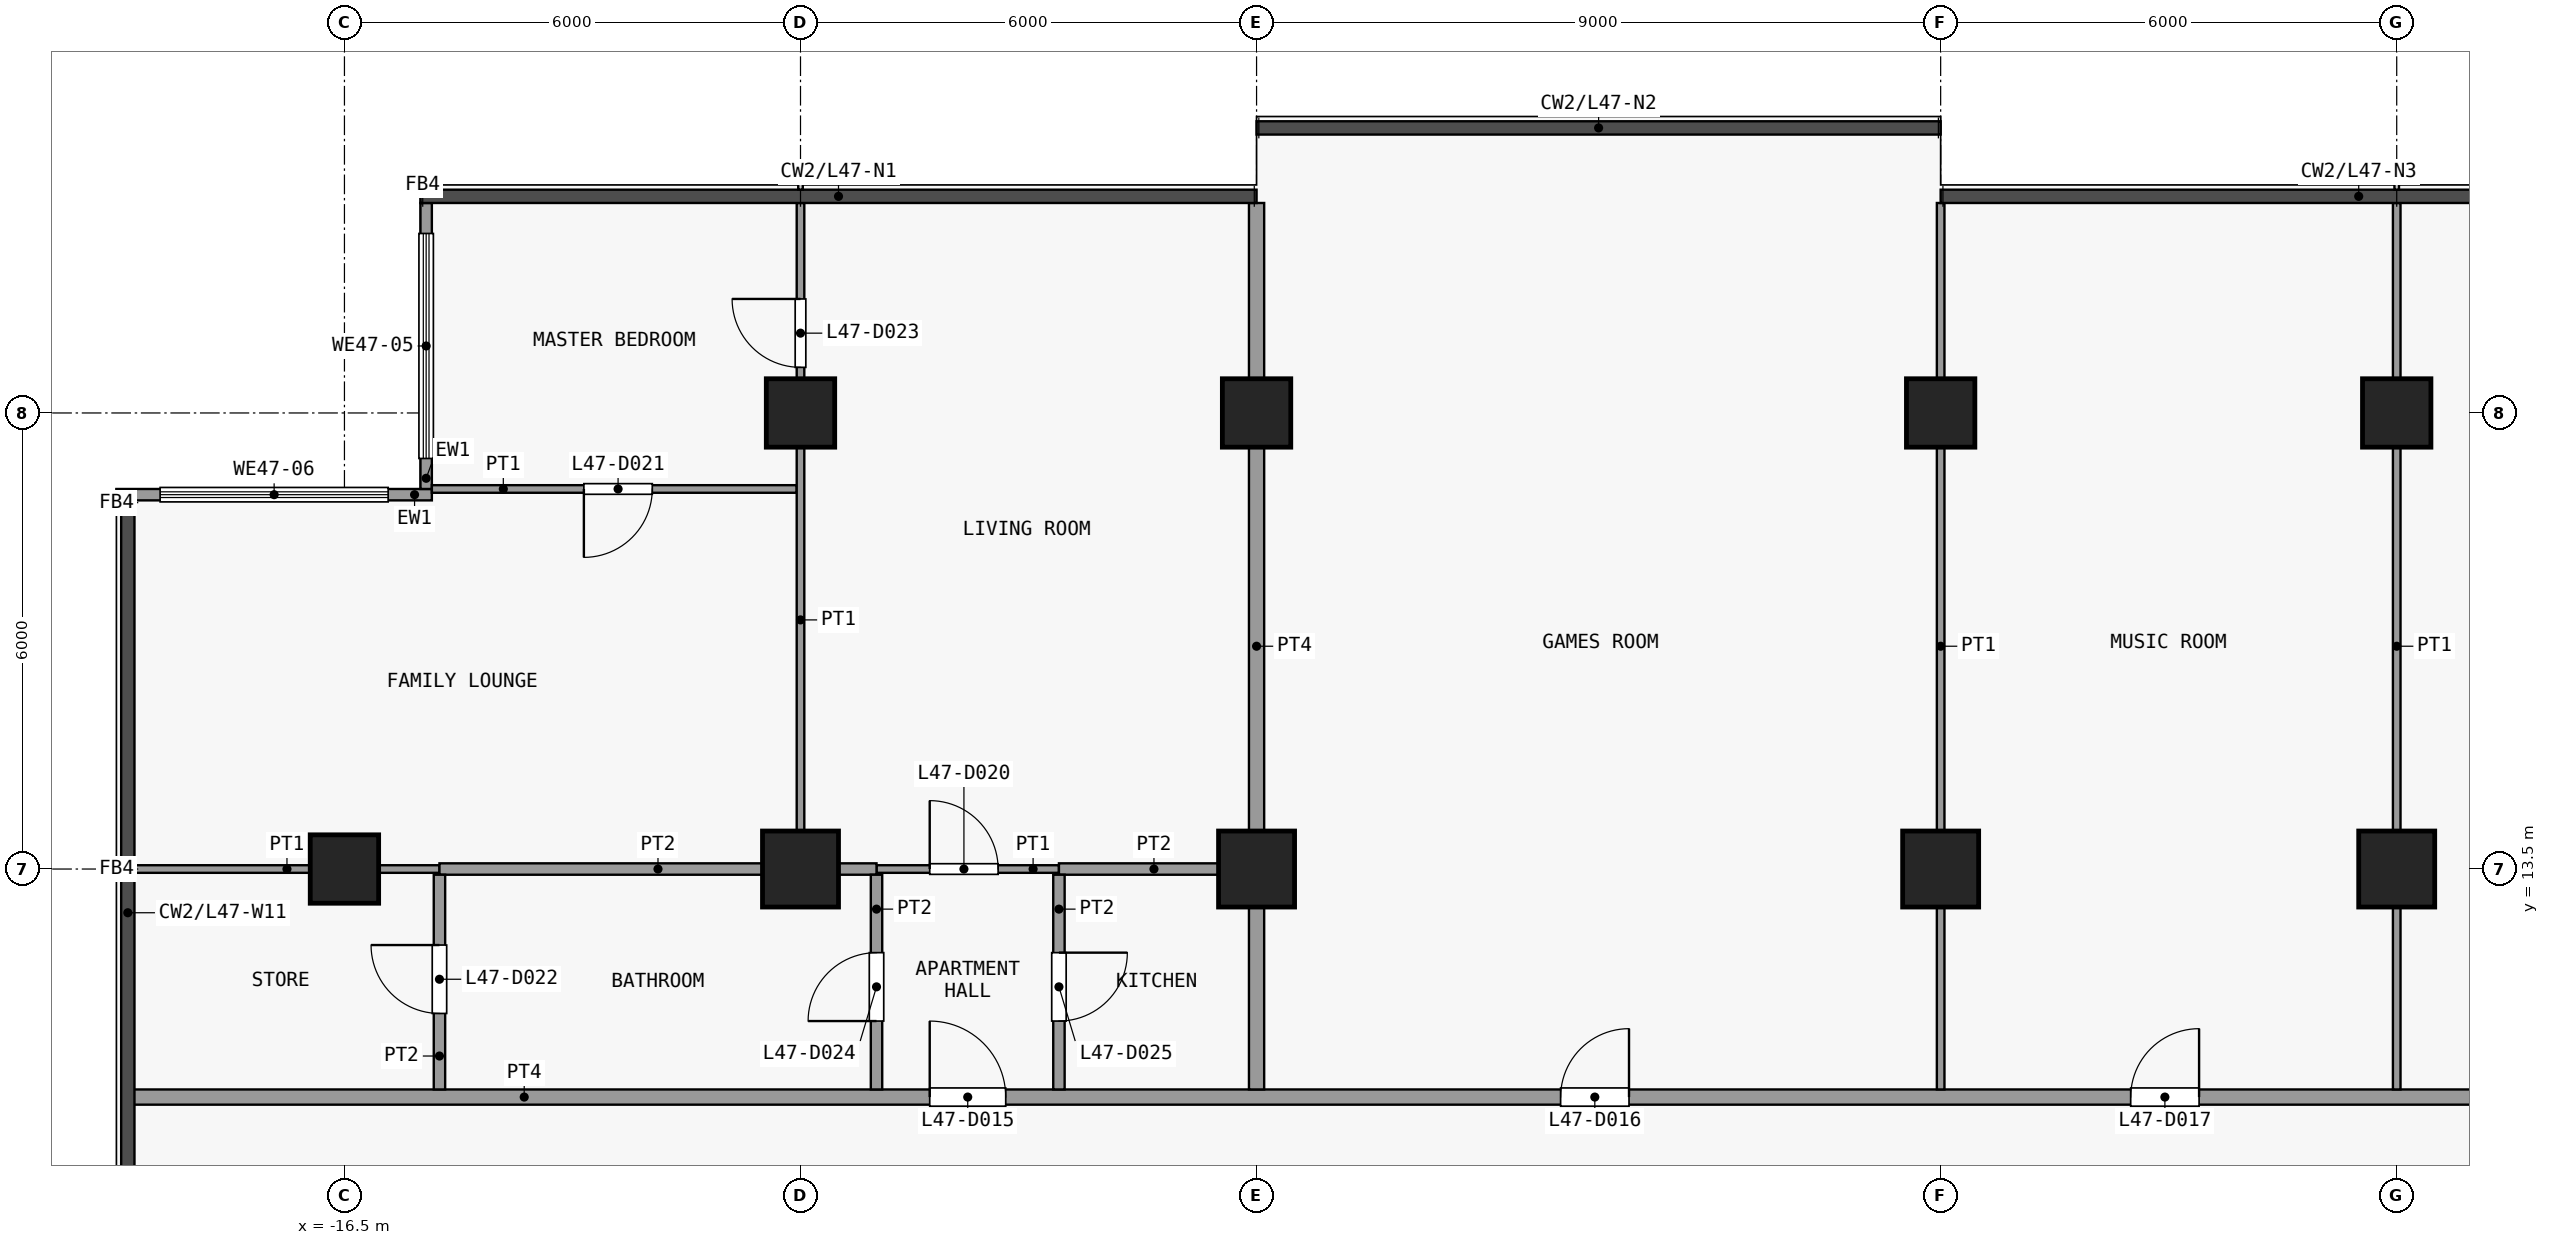
"""IFC4 building model, lengths in metres.
Left out: names, types, materials, properties, quantities, classifications, styles, units other than length and angle.
Written with IfcOpenShell. Run it as: python <this file> out.ifc"""

import sys

from ifc_helpers import new_model, si_unit, direction, frame, frame_2d, origin, origin_2d, place, context, subcontext, project, spatial, rectangle, extrude, element, fill, save


model = new_model("IFC4")
c1 = context("Model", 3, precision=1e-05, world=origin(), true_north=direction((0.0, 1.0)))
c2 = subcontext(c1, "Body", "Model", "MODEL_VIEW")
j1 = project(units=[si_unit("LENGTHUNIT", "METRE"), si_unit("PLANEANGLEUNIT", "RADIAN")], contexts=[c1])
p1 = place(None, origin())
s1 = spatial("IfcSite", under=j1, at=p1, CompositionType="ELEMENT")
p2 = place(p1, origin())
s2 = spatial("IfcBuilding", under=s1, at=p2, CompositionType="ELEMENT")
p3 = place(p2, frame((0.0, 0.0, 188.9)))
s3 = spatial("IfcBuildingStorey", under=s2, at=p3, CompositionType="ELEMENT", Elevation=188.9)
p4 = place(p3, frame((-16.5, 13.5, 0.0), z_axis=(0.0, 0.0, 1.0), x_axis=(1.0, 0.0, 0.0)))
e1 = element("IfcColumn", 1, at=p4, inside=s3, PredefinedType="COLUMN", context=c2, shape_type="SweptSolid", body=[
    extrude(rectangle(XDim=0.9, YDim=0.9, at=origin_2d()), origin(), (0.0, 0.0, 1.0), 3.6),
])
p5 = place(p3, frame((-10.5, 13.5, 0.0), z_axis=(0.0, 0.0, 1.0), x_axis=(1.0, 0.0, 0.0)))
e2 = element("IfcColumn", 2, at=p5, inside=s3, PredefinedType="COLUMN", context=c2, shape_type="SweptSolid", body=[
    extrude(rectangle(XDim=1.0, YDim=1.0, at=origin_2d()), origin(), (0.0, 0.0, 1.0), 3.6),
])
p6 = place(p3, frame((-10.5, 19.5, 0.0), z_axis=(0.0, 0.0, 1.0), x_axis=(1.0, 0.0, 0.0)))
e3 = element("IfcColumn", 3, at=p6, inside=s3, PredefinedType="COLUMN", context=c2, shape_type="SweptSolid", body=[
    extrude(rectangle(XDim=0.9, YDim=0.9, at=origin_2d()), origin(), (0.0, 0.0, 1.0), 3.6),
])
p7 = place(p3, frame((-4.5, 13.5, 0.0), z_axis=(0.0, 0.0, 1.0), x_axis=(1.0, 0.0, 0.0)))
e4 = element("IfcColumn", 4, at=p7, inside=s3, PredefinedType="COLUMN", context=c2, shape_type="SweptSolid", body=[
    extrude(rectangle(XDim=1.0, YDim=1.0, at=origin_2d()), origin(), (0.0, 0.0, 1.0), 3.6),
])
p8 = place(p3, frame((-4.5, 19.5, 0.0), z_axis=(0.0, 0.0, 1.0), x_axis=(1.0, 0.0, 0.0)))
e5 = element("IfcColumn", 5, at=p8, inside=s3, PredefinedType="COLUMN", context=c2, shape_type="SweptSolid", body=[
    extrude(rectangle(XDim=0.9, YDim=0.9, at=origin_2d()), origin(), (0.0, 0.0, 1.0), 3.6),
])
p9 = place(p3, frame((4.5, 13.5, 0.0), z_axis=(0.0, 0.0, 1.0), x_axis=(1.0, 0.0, 0.0)))
e6 = element("IfcColumn", 6, at=p9, inside=s3, PredefinedType="COLUMN", context=c2, shape_type="SweptSolid", body=[
    extrude(rectangle(XDim=1.0, YDim=1.0, at=origin_2d()), origin(), (0.0, 0.0, 1.0), 3.6),
])
p10 = place(p3, frame((4.5, 19.5, 0.0), z_axis=(0.0, 0.0, 1.0), x_axis=(1.0, 0.0, 0.0)))
e7 = element("IfcColumn", 7, at=p10, inside=s3, PredefinedType="COLUMN", context=c2, shape_type="SweptSolid", body=[
    extrude(rectangle(XDim=0.9, YDim=0.9, at=origin_2d()), origin(), (0.0, 0.0, 1.0), 3.6),
])
p11 = place(p3, frame((10.5, 13.5, 0.0), z_axis=(0.0, 0.0, 1.0), x_axis=(1.0, 0.0, 0.0)))
e8 = element("IfcColumn", 8, at=p11, inside=s3, PredefinedType="COLUMN", context=c2, shape_type="SweptSolid", body=[
    extrude(rectangle(XDim=1.0, YDim=1.0, at=origin_2d()), origin(), (0.0, 0.0, 1.0), 3.6),
])
p12 = place(p3, frame((10.5, 19.5, 0.0), z_axis=(0.0, 0.0, 1.0), x_axis=(1.0, 0.0, 0.0)))
e9 = element("IfcColumn", 9, at=p12, inside=s3, PredefinedType="COLUMN", context=c2, shape_type="SweptSolid", body=[
    extrude(rectangle(XDim=0.9, YDim=0.9, at=origin_2d()), origin(), (0.0, 0.0, 1.0), 3.6),
])
p13 = place(p3, frame((-15.425, 18.5, 0.0), z_axis=(0.0, 0.0, 1.0), x_axis=(0.0, 1.0, 0.0)))
e10 = element("IfcWall", 10, at=p13, inside=s3, PredefinedType="SOLIDWALL", context=c2, shape_type="SweptSolid", body=[
    extrude(rectangle(XDim=3.762, YDim=0.15, at=frame_2d((1.881, 0.0))), origin(), (0.0, 0.0, 1.0), 3.3),
])
p14 = place(p13, frame((0.401, 0.0, 0.9)))
e11 = element("IfcOpeningElement", 11, at=p14, cuts=e10, PredefinedType="OPENING", context=c2, shape_type="SweptSolid", body=[
    extrude(rectangle(XDim=2.96, YDim=2.4, at=frame_2d((1.48, 1.2))), frame((0.0, 0.085, 0.0), z_axis=(0.0, -1.0, 0.0), x_axis=(1.0, 0.0, 0.0)), (0.0, 0.0, 1.0), 0.17),
])
p15 = place(p3, frame((-19.5, 18.425, 0.0), z_axis=(0.0, 0.0, 1.0), x_axis=(1.0, 0.0, 0.0)))
e12 = element("IfcWall", 12, at=p15, inside=s3, PredefinedType="SOLIDWALL", context=c2, shape_type="SweptSolid", body=[
    extrude(rectangle(XDim=4.15, YDim=0.15, at=frame_2d((2.075, 0.0))), origin(), (0.0, 0.0, 1.0), 3.3),
])
p16 = place(p15, frame((0.575, 0.0, 0.9)))
e13 = element("IfcOpeningElement", 13, at=p16, cuts=e12, PredefinedType="OPENING", context=c2, shape_type="SweptSolid", body=[
    extrude(rectangle(XDim=3.0, YDim=2.4, at=frame_2d((1.5, 1.2))), frame((0.0, 0.085, 0.0), z_axis=(0.0, -1.0, 0.0), x_axis=(1.0, 0.0, 0.0)), (0.0, 0.0, 1.0), 0.17),
])
p17 = place(p3, frame((-19.35, 10.5, 0.0), z_axis=(0.0, 0.0, 1.0), x_axis=(1.0, 0.0, 0.0)))
e14 = element("IfcWall", 14, at=p17, inside=s3, PredefinedType="PARTITIONING", context=c2, shape_type="SweptSolid", body=[
    extrude(rectangle(XDim=38.7, YDim=0.2, at=frame_2d((19.35, 0.0))), origin(), (0.0, 0.0, 1.0), 3.3),
])
p18 = place(p17, frame((10.55, 0.0, 0.0)))
e15 = element("IfcOpeningElement", 15, at=p18, cuts=e14, PredefinedType="OPENING", context=c2, shape_type="SweptSolid", body=[
    extrude(rectangle(XDim=1.0, YDim=2.1, at=frame_2d((0.5, 1.05))), frame((0.0, 0.11, 0.0), z_axis=(0.0, -1.0, 0.0), x_axis=(1.0, 0.0, 0.0)), (0.0, 0.0, 1.0), 0.22),
])
p19 = place(p17, frame((18.85, 0.0, 0.0)))
e16 = element("IfcOpeningElement", 16, at=p19, cuts=e14, PredefinedType="OPENING", context=c2, shape_type="SweptSolid", body=[
    extrude(rectangle(XDim=0.9, YDim=2.1, at=frame_2d((0.45, 1.05))), frame((0.0, 0.11, 0.0), z_axis=(0.0, -1.0, 0.0), x_axis=(1.0, 0.0, 0.0)), (0.0, 0.0, 1.0), 0.22),
])
p20 = place(p17, frame((26.35, 0.0, 0.0)))
e17 = element("IfcOpeningElement", 17, at=p20, cuts=e14, PredefinedType="OPENING", context=c2, shape_type="SweptSolid", body=[
    extrude(rectangle(XDim=0.9, YDim=2.1, at=frame_2d((0.45, 1.05))), frame((0.0, 0.11, 0.0), z_axis=(0.0, -1.0, 0.0), x_axis=(1.0, 0.0, 0.0)), (0.0, 0.0, 1.0), 0.22),
])
p21 = place(p17, frame((32.35, 0.0, 0.0)))
e18 = element("IfcOpeningElement", 18, at=p21, cuts=e14, PredefinedType="OPENING", context=c2, shape_type="SweptSolid", body=[
    extrude(rectangle(XDim=0.9, YDim=2.1, at=frame_2d((0.45, 1.05))), frame((0.0, 0.11, 0.0), z_axis=(0.0, -1.0, 0.0), x_axis=(1.0, 0.0, 0.0)), (0.0, 0.0, 1.0), 0.22),
])
p22 = place(p17, frame((36.85, 0.0, 0.0)))
e19 = element("IfcOpeningElement", 19, at=p22, cuts=e14, PredefinedType="OPENING", context=c2, shape_type="SweptSolid", body=[
    extrude(rectangle(XDim=0.9, YDim=2.1, at=frame_2d((0.45, 1.05))), frame((0.0, 0.11, 0.0), z_axis=(0.0, -1.0, 0.0), x_axis=(1.0, 0.0, 0.0)), (0.0, 0.0, 1.0), 0.22),
])
p23 = place(p3, frame((-19.262, 13.5, 0.0), z_axis=(0.0, 0.0, 1.0), x_axis=(1.0, 0.0, 0.0)))
e20 = element("IfcWall", 20, at=p23, inside=s3, PredefinedType="PARTITIONING", context=c2, shape_type="SweptSolid", body=[
    extrude(rectangle(XDim=4.012, YDim=0.1, at=frame_2d((2.006, 0.0))), origin(), (0.0, 0.0, 1.0), 3.3),
])
p24 = place(p3, frame((-9.5, 13.5, 0.0), z_axis=(0.0, 0.0, 1.0), x_axis=(1.0, 0.0, 0.0)))
e21 = element("IfcWall", 21, at=p24, inside=s3, PredefinedType="PARTITIONING", context=c2, shape_type="SweptSolid", body=[
    extrude(rectangle(XDim=2.4, YDim=0.1, at=frame_2d((1.2, 0.0))), origin(), (0.0, 0.0, 1.0), 3.3),
])
p25 = place(p24, frame((0.7, 0.0, 0.0)))
e22 = element("IfcOpeningElement", 22, at=p25, cuts=e21, PredefinedType="OPENING", context=c2, shape_type="SweptSolid", body=[
    extrude(rectangle(XDim=0.9, YDim=2.1, at=frame_2d((0.45, 1.05))), frame((0.0, 0.06, 0.0), z_axis=(0.0, -1.0, 0.0), x_axis=(1.0, 0.0, 0.0)), (0.0, 0.0, 1.0), 0.12),
])
p26 = place(p3, frame((-15.25, 13.5, 0.0), z_axis=(0.0, 0.0, 1.0), x_axis=(1.0, 0.0, 0.0)))
e23 = element("IfcWall", 23, at=p26, inside=s3, PredefinedType="PARTITIONING", context=c2, shape_type="SweptSolid", body=[
    extrude(rectangle(XDim=5.75, YDim=0.15, at=frame_2d((2.875, 0.0))), origin(), (0.0, 0.0, 1.0), 3.3),
])
p27 = place(p3, frame((-7.1, 13.5, 0.0), z_axis=(0.0, 0.0, 1.0), x_axis=(1.0, 0.0, 0.0)))
e24 = element("IfcWall", 24, at=p27, inside=s3, PredefinedType="PARTITIONING", context=c2, shape_type="SweptSolid", body=[
    extrude(rectangle(XDim=2.5, YDim=0.15, at=frame_2d((1.25, 0.0))), origin(), (0.0, 0.0, 1.0), 3.3),
])
p28 = place(p3, frame((-15.35, 18.5, 0.0), z_axis=(0.0, 0.0, 1.0), x_axis=(1.0, 0.0, 0.0)))
e25 = element("IfcWall", 25, at=p28, inside=s3, PredefinedType="PARTITIONING", context=c2, shape_type="SweptSolid", body=[
    extrude(rectangle(XDim=4.8, YDim=0.1, at=frame_2d((2.4, 0.0))), origin(), (0.0, 0.0, 1.0), 3.3),
])
p29 = place(p28, frame((2.0, 0.0, 0.0)))
e26 = element("IfcOpeningElement", 26, at=p29, cuts=e25, PredefinedType="OPENING", context=c2, shape_type="SweptSolid", body=[
    extrude(rectangle(XDim=0.9, YDim=2.1, at=frame_2d((0.45, 1.05))), frame((0.0, 0.06, 0.0), z_axis=(0.0, -1.0, 0.0), x_axis=(1.0, 0.0, 0.0)), (0.0, 0.0, 1.0), 0.12),
])
p30 = place(p3, frame((-15.25, 10.6, 0.0), z_axis=(0.0, 0.0, 1.0), x_axis=(0.0, 1.0, 0.0)))
e27 = element("IfcWall", 27, at=p30, inside=s3, PredefinedType="PARTITIONING", context=c2, shape_type="SweptSolid", body=[
    extrude(rectangle(XDim=2.825, YDim=0.15, at=frame_2d((1.413, 0.0))), origin(), (0.0, 0.0, 1.0), 3.3),
])
p31 = place(p30, frame((1.0, 0.0, 0.0)))
e28 = element("IfcOpeningElement", 28, at=p31, cuts=e27, PredefinedType="OPENING", context=c2, shape_type="SweptSolid", body=[
    extrude(rectangle(XDim=0.9, YDim=2.1, at=frame_2d((0.45, 1.05))), frame((0.0, 0.085, 0.0), z_axis=(0.0, -1.0, 0.0), x_axis=(1.0, 0.0, 0.0)), (0.0, 0.0, 1.0), 0.17),
])
p32 = place(p3, frame((-10.5, 13.575, 0.0), z_axis=(0.0, 0.0, 1.0), x_axis=(0.0, 1.0, 0.0)))
e29 = element("IfcWall", 29, at=p32, inside=s3, PredefinedType="PARTITIONING", context=c2, shape_type="SweptSolid", body=[
    extrude(rectangle(XDim=8.688, YDim=0.1, at=frame_2d((4.344, 0.0))), origin(), (0.0, 0.0, 1.0), 3.3),
])
p33 = place(p32, frame((6.525, 0.0, 0.0)))
e30 = element("IfcOpeningElement", 30, at=p33, cuts=e29, PredefinedType="OPENING", context=c2, shape_type="SweptSolid", body=[
    extrude(rectangle(XDim=0.9, YDim=2.1, at=frame_2d((0.45, 1.05))), frame((0.0, 0.06, 0.0), z_axis=(0.0, -1.0, 0.0), x_axis=(1.0, 0.0, 0.0)), (0.0, 0.0, 1.0), 0.12),
])
p34 = place(p3, frame((-9.5, 10.6, 0.0), z_axis=(0.0, 0.0, 1.0), x_axis=(0.0, 1.0, 0.0)))
e31 = element("IfcWall", 31, at=p34, inside=s3, PredefinedType="PARTITIONING", context=c2, shape_type="SweptSolid", body=[
    extrude(rectangle(XDim=2.825, YDim=0.15, at=frame_2d((1.413, 0.0))), origin(), (0.0, 0.0, 1.0), 3.3),
])
p35 = place(p34, frame((0.9, 0.0, 0.0)))
e32 = element("IfcOpeningElement", 32, at=p35, cuts=e31, PredefinedType="OPENING", context=c2, shape_type="SweptSolid", body=[
    extrude(rectangle(XDim=0.9, YDim=2.1, at=frame_2d((0.45, 1.05))), frame((0.0, 0.085, 0.0), z_axis=(0.0, -1.0, 0.0), x_axis=(1.0, 0.0, 0.0)), (0.0, 0.0, 1.0), 0.17),
])
p36 = place(p3, frame((-7.1, 10.6, 0.0), z_axis=(0.0, 0.0, 1.0), x_axis=(0.0, 1.0, 0.0)))
e33 = element("IfcWall", 33, at=p36, inside=s3, PredefinedType="PARTITIONING", context=c2, shape_type="SweptSolid", body=[
    extrude(rectangle(XDim=2.825, YDim=0.15, at=frame_2d((1.413, 0.0))), origin(), (0.0, 0.0, 1.0), 3.3),
])
p37 = place(p36, frame((0.9, 0.0, 0.0)))
e34 = element("IfcOpeningElement", 34, at=p37, cuts=e33, PredefinedType="OPENING", context=c2, shape_type="SweptSolid", body=[
    extrude(rectangle(XDim=0.9, YDim=2.1, at=frame_2d((0.45, 1.05))), frame((0.0, 0.085, 0.0), z_axis=(0.0, -1.0, 0.0), x_axis=(1.0, 0.0, 0.0)), (0.0, 0.0, 1.0), 0.17),
])
p38 = place(p3, frame((-4.5, 10.6, 0.0), z_axis=(0.0, 0.0, 1.0), x_axis=(0.0, 1.0, 0.0)))
e35 = element("IfcWall", 35, at=p38, inside=s3, PredefinedType="PARTITIONING", context=c2, shape_type="SweptSolid", body=[
    extrude(rectangle(XDim=11.662, YDim=0.2, at=frame_2d((5.831, 0.0))), origin(), (0.0, 0.0, 1.0), 3.3),
])
for number, where, z_axis, x_axis in (
    (36, (4.5, 10.6, 0.0), (0.0, 0.0, 1.0), (0.0, 1.0, 0.0)),
    (37, (10.5, 10.6, 0.0), (0.0, 0.0, 1.0), (0.0, 1.0, 0.0)),
):
    element("IfcWall", number, at=place(p3, frame(where, z_axis=z_axis, x_axis=x_axis)), inside=s3, PredefinedType="PARTITIONING", context=c2, shape_type="SweptSolid", body=[
        extrude(rectangle(XDim=11.662, YDim=0.1, at=frame_2d((5.831, 0.0))), origin(), (0.0, 0.0, 1.0), 3.3),
    ])
p39 = place(p14, origin())
e38 = element("IfcWindow", 38, at=p39, inside=s3, PartitioningType="SINGLE_PANEL", PredefinedType="WINDOW", context=c2, shape_type="SweptSolid", body=[
    extrude(rectangle(XDim=2.96, YDim=2.4, at=frame_2d((1.48, 1.2))), frame((0.0, 0.03, 0.0), z_axis=(0.0, -1.0, 0.0), x_axis=(1.0, 0.0, 0.0)), (0.0, 0.0, 1.0), 0.06),
])
fill(e11, e38)
p40 = place(p16, origin())
e39 = element("IfcWindow", 39, at=p40, inside=s3, PartitioningType="SINGLE_PANEL", PredefinedType="WINDOW", context=c2, shape_type="SweptSolid", body=[
    extrude(rectangle(XDim=3.0, YDim=2.4, at=frame_2d((1.5, 1.2))), frame((0.0, 0.03, 0.0), z_axis=(0.0, -1.0, 0.0), x_axis=(1.0, 0.0, 0.0)), (0.0, 0.0, 1.0), 0.06),
])
fill(e13, e39)
p41 = place(p18, origin())
e40 = element("IfcDoor", 40, at=p41, inside=s3, OperationType="SINGLE_SWING_RIGHT", PredefinedType="DOOR", context=c2, shape_type="SweptSolid", body=[
    extrude(rectangle(XDim=1.0, YDim=2.1, at=frame_2d((0.5, 1.05))), frame((0.0, 0.025, 0.0), z_axis=(0.0, -1.0, 0.0), x_axis=(1.0, 0.0, 0.0)), (0.0, 0.0, 1.0), 0.05),
])
fill(e15, e40)
p42 = place(p19, origin())
e41 = element("IfcDoor", 41, at=p42, inside=s3, OperationType="SINGLE_SWING_LEFT", PredefinedType="DOOR", context=c2, shape_type="SweptSolid", body=[
    extrude(rectangle(XDim=0.9, YDim=2.1, at=frame_2d((0.45, 1.05))), frame((0.0, 0.025, 0.0), z_axis=(0.0, -1.0, 0.0), x_axis=(1.0, 0.0, 0.0)), (0.0, 0.0, 1.0), 0.05),
])
fill(e16, e41)
p43 = place(p20, origin())
e42 = element("IfcDoor", 42, at=p43, inside=s3, OperationType="SINGLE_SWING_LEFT", PredefinedType="DOOR", context=c2, shape_type="SweptSolid", body=[
    extrude(rectangle(XDim=0.9, YDim=2.1, at=frame_2d((0.45, 1.05))), frame((0.0, 0.025, 0.0), z_axis=(0.0, -1.0, 0.0), x_axis=(1.0, 0.0, 0.0)), (0.0, 0.0, 1.0), 0.05),
])
fill(e17, e42)
p44 = place(p25, origin())
e43 = element("IfcDoor", 43, at=p44, inside=s3, OperationType="SINGLE_SWING_RIGHT", PredefinedType="DOOR", context=c2, shape_type="SweptSolid", body=[
    extrude(rectangle(XDim=0.9, YDim=2.1, at=frame_2d((0.45, 1.05))), frame((0.0, 0.025, 0.0), z_axis=(0.0, -1.0, 0.0), x_axis=(1.0, 0.0, 0.0)), (0.0, 0.0, 1.0), 0.05),
])
fill(e22, e43)
p45 = place(p29, origin())
e44 = element("IfcDoor", 44, at=p45, inside=s3, OperationType="SINGLE_SWING_LEFT", PredefinedType="DOOR", context=c2, shape_type="SweptSolid", body=[
    extrude(rectangle(XDim=0.9, YDim=2.1, at=frame_2d((0.45, 1.05))), frame((0.0, 0.025, 0.0), z_axis=(0.0, -1.0, 0.0), x_axis=(1.0, 0.0, 0.0)), (0.0, 0.0, 1.0), 0.05),
])
fill(e26, e44)
p46 = place(p31, origin())
e45 = element("IfcDoor", 45, at=p46, inside=s3, OperationType="SINGLE_SWING_LEFT", PredefinedType="DOOR", context=c2, shape_type="SweptSolid", body=[
    extrude(rectangle(XDim=0.9, YDim=2.1, at=frame_2d((0.45, 1.05))), frame((0.0, 0.025, 0.0), z_axis=(0.0, -1.0, 0.0), x_axis=(1.0, 0.0, 0.0)), (0.0, 0.0, 1.0), 0.05),
])
fill(e28, e45)
p47 = place(p33, origin())
e46 = element("IfcDoor", 46, at=p47, inside=s3, OperationType="SINGLE_SWING_LEFT", PredefinedType="DOOR", context=c2, shape_type="SweptSolid", body=[
    extrude(rectangle(XDim=0.9, YDim=2.1, at=frame_2d((0.45, 1.05))), frame((0.0, 0.025, 0.0), z_axis=(0.0, -1.0, 0.0), x_axis=(1.0, 0.0, 0.0)), (0.0, 0.0, 1.0), 0.05),
])
fill(e30, e46)
p48 = place(p35, origin())
e47 = element("IfcDoor", 47, at=p48, inside=s3, OperationType="SINGLE_SWING_RIGHT", PredefinedType="DOOR", context=c2, shape_type="SweptSolid", body=[
    extrude(rectangle(XDim=0.9, YDim=2.1, at=frame_2d((0.45, 1.05))), frame((0.0, 0.025, 0.0), z_axis=(0.0, -1.0, 0.0), x_axis=(1.0, 0.0, 0.0)), (0.0, 0.0, 1.0), 0.05),
])
fill(e32, e47)
p49 = place(p37, origin())
e48 = element("IfcDoor", 48, at=p49, inside=s3, OperationType="SINGLE_SWING_RIGHT", PredefinedType="DOOR", context=c2, shape_type="SweptSolid", body=[
    extrude(rectangle(XDim=0.9, YDim=2.1, at=frame_2d((0.45, 1.05))), frame((0.0, 0.025, 0.0), z_axis=(0.0, -1.0, 0.0), x_axis=(1.0, 0.0, 0.0)), (0.0, 0.0, 1.0), 0.05),
])
fill(e34, e48)
save(model, sys.argv[1])
